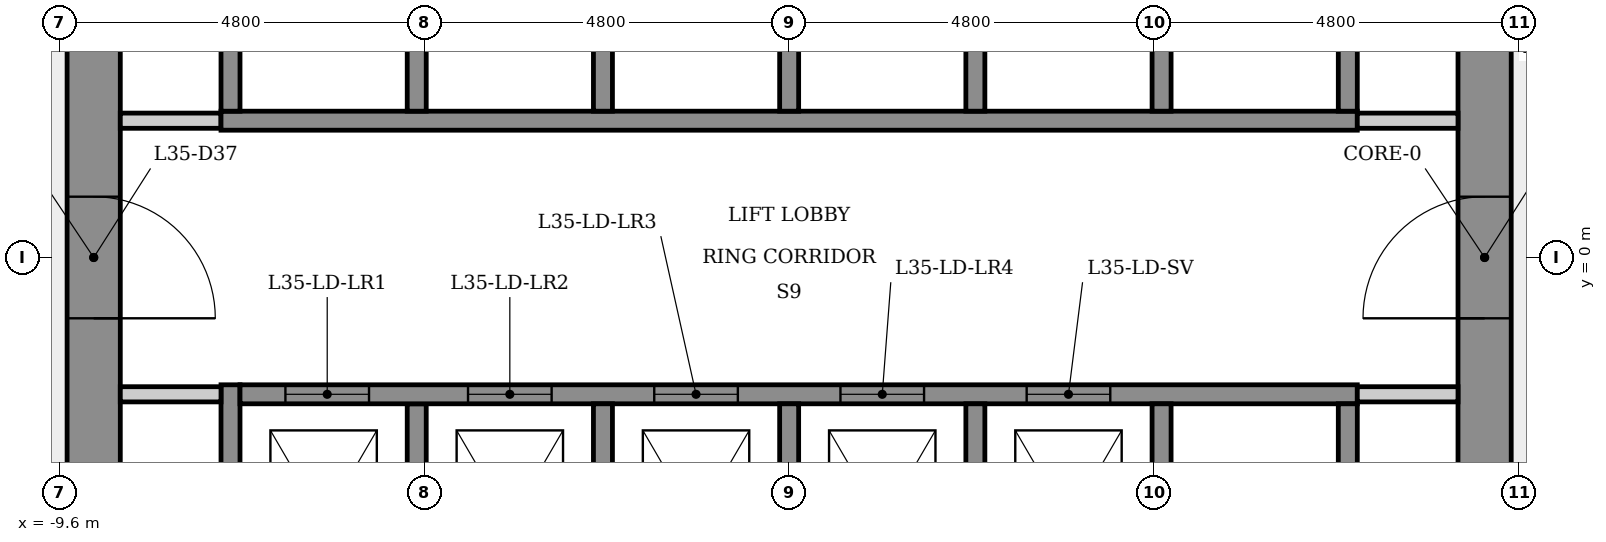
"""IFC4 building model, lengths in metres.
Left out: names, types, materials, properties, quantities, classifications, styles, units other than length and angle.
Written with IfcOpenShell. Run it as: python <this file> out.ifc"""

import sys

from ifc_helpers import new_model, si_unit, direction, frame, frame_2d, origin, place, context, subcontext, project, spatial, rectangle, extrude, element, fill, save


model = new_model("IFC4")
c1 = context("Model", 3, precision=1e-05, world=origin(), true_north=direction((0.0, 1.0)))
c2 = subcontext(c1, "Body", "Model", "MODEL_VIEW")
j1 = project(units=[si_unit("LENGTHUNIT", "METRE"), si_unit("PLANEANGLEUNIT", "RADIAN")], contexts=[c1])
p1 = place(None, origin())
s1 = spatial("IfcSite", under=j1, at=p1, CompositionType="ELEMENT")
p2 = place(p1, origin())
s2 = spatial("IfcBuilding", under=s1, at=p2, CompositionType="ELEMENT")
p3 = place(p2, frame((0.0, 0.0, 132.5)))
s3 = spatial("IfcBuildingStorey", under=s2, at=p3, CompositionType="ELEMENT", Elevation=132.5)
p4 = place(p3, frame((9.15, -5.485, 0.0), z_axis=(0.0, 0.0, 1.0), x_axis=(0.0, 1.0, 0.0)))
e1 = element("IfcWall", 1, at=p4, inside=s3, PredefinedType="SHEAR", context=c2, shape_type="SweptSolid", body=[
    extrude(rectangle(XDim=10.97, YDim=0.7, at=frame_2d((5.485, 0.0))), origin(), (0.0, 0.0, 1.0), 3.4),
])
p5 = place(p4, frame((4.685, 0.0, 0.0)))
e2 = element("IfcOpeningElement", 2, at=p5, cuts=e1, PredefinedType="OPENING", context=c2, shape_type="SweptSolid", body=[
    extrude(rectangle(XDim=1.6, YDim=2.1, at=frame_2d((0.8, 1.05))), frame((0.0, 0.36, 0.0), z_axis=(0.0, -1.0, 0.0), x_axis=(1.0, 0.0, 0.0)), (0.0, 0.0, 1.0), 0.72),
])
p6 = place(p3, frame((-9.15, 5.485, 0.0), z_axis=(0.0, 0.0, 1.0), x_axis=(0.0, -1.0, 0.0)))
e3 = element("IfcWall", 3, at=p6, inside=s3, PredefinedType="SHEAR", context=c2, shape_type="SweptSolid", body=[
    extrude(rectangle(XDim=10.97, YDim=0.7, at=frame_2d((5.485, 0.0))), origin(), (0.0, 0.0, 1.0), 3.4),
])
p7 = place(p6, frame((4.685, 0.0, 0.0)))
e4 = element("IfcOpeningElement", 4, at=p7, cuts=e3, PredefinedType="OPENING", context=c2, shape_type="SweptSolid", body=[
    extrude(rectangle(XDim=1.6, YDim=2.1, at=frame_2d((0.8, 1.05))), frame((0.0, 0.36, 0.0), z_axis=(0.0, -1.0, 0.0), x_axis=(1.0, 0.0, 0.0)), (0.0, 0.0, 1.0), 0.72),
])
p8 = place(p3, frame((-8.8, 1.8, 0.0), z_axis=(0.0, 0.0, 1.0), x_axis=(1.0, 0.0, 0.0)))
e5 = element("IfcWall", 5, at=p8, inside=s3, PredefinedType="PARTITIONING", context=c2, shape_type="SweptSolid", body=[
    extrude(rectangle(XDim=1.325, YDim=0.2, at=frame_2d((0.663, 0.0))), origin(), (0.0, 0.0, 1.0), 3.0),
])
p9 = place(p3, frame((-7.475, 1.8, 0.0), z_axis=(0.0, 0.0, 1.0), x_axis=(1.0, 0.0, 0.0)))
e6 = element("IfcWall", 6, at=p9, inside=s3, PredefinedType="SHEAR", context=c2, shape_type="SweptSolid", body=[
    extrude(rectangle(XDim=14.95, YDim=0.25, at=frame_2d((7.475, 0.0))), origin(), (0.0, 0.0, 1.0), 3.0),
])
p10 = place(p3, frame((-7.35, -5.846, 0.0), z_axis=(0.0, 0.0, 1.0), x_axis=(0.0, 1.0, 0.0)))
e7 = element("IfcWall", 7, at=p10, inside=s3, PredefinedType="SHEAR", context=c2, shape_type="SweptSolid", body=[
    extrude(rectangle(XDim=4.171, YDim=0.25, at=frame_2d((2.085, 0.0))), origin(), (0.0, 0.0, 1.0), 3.0),
])
p11 = place(p3, frame((-7.35, 1.925, 0.0), z_axis=(0.0, 0.0, 1.0), x_axis=(0.0, 1.0, 0.0)))
e8 = element("IfcWall", 8, at=p11, inside=s3, PredefinedType="SHEAR", context=c2, shape_type="SweptSolid", body=[
    extrude(rectangle(XDim=3.921, YDim=0.25, at=frame_2d((1.96, 0.0))), origin(), (0.0, 0.0, 1.0), 3.0),
])
p12 = place(p3, frame((-7.475, -1.8, 0.0), z_axis=(0.0, 0.0, 1.0), x_axis=(-1.0, 0.0, 0.0)))
e9 = element("IfcWall", 9, at=p12, inside=s3, PredefinedType="PARTITIONING", context=c2, shape_type="SweptSolid", body=[
    extrude(rectangle(XDim=1.325, YDim=0.2, at=frame_2d((0.663, 0.0))), origin(), (0.0, 0.0, 1.0), 3.0),
])
for number, where, z_axis, x_axis in (
    (10, (-4.9, -1.925, 0.0), (0.0, 0.0, 1.0), (0.0, -1.0, 0.0)),
    (11, (-4.9, 5.025, 0.0), (0.0, 0.0, 1.0), (0.0, -1.0, 0.0)),
):
    element("IfcWall", number, at=place(p3, frame(where, z_axis=z_axis, x_axis=x_axis)), inside=s3, PredefinedType="SHEAR", context=c2, shape_type="SweptSolid", body=[
        extrude(rectangle(XDim=3.1, YDim=0.25, at=frame_2d((1.55, 0.0))), origin(), (0.0, 0.0, 1.0), 3.4),
    ])
p13 = place(p3, frame((-7.225, -1.8, 0.0), z_axis=(0.0, 0.0, 1.0), x_axis=(1.0, 0.0, 0.0)))
e12 = element("IfcWall", 12, at=p13, inside=s3, PredefinedType="SHEAR", context=c2, shape_type="SweptSolid", body=[
    extrude(rectangle(XDim=14.7, YDim=0.25, at=frame_2d((7.35, 0.0))), origin(), (0.0, 0.0, 1.0), 3.0),
])
p14 = place(p13, frame((0.597, 0.0, 0.0)))
e13 = element("IfcOpeningElement", 13, at=p14, cuts=e12, PredefinedType="OPENING", context=c2, shape_type="SweptSolid", body=[
    extrude(rectangle(XDim=1.1, YDim=2.1, at=frame_2d((0.55, 1.05))), frame((0.0, 0.135, 0.0), z_axis=(0.0, -1.0, 0.0), x_axis=(1.0, 0.0, 0.0)), (0.0, 0.0, 1.0), 0.27),
])
p15 = place(p13, frame((3.0, 0.0, 0.0)))
e14 = element("IfcOpeningElement", 14, at=p15, cuts=e12, PredefinedType="OPENING", context=c2, shape_type="SweptSolid", body=[
    extrude(rectangle(XDim=1.1, YDim=2.1, at=frame_2d((0.55, 1.05))), frame((0.0, 0.135, 0.0), z_axis=(0.0, -1.0, 0.0), x_axis=(1.0, 0.0, 0.0)), (0.0, 0.0, 1.0), 0.27),
])
p16 = place(p13, frame((5.45, 0.0, 0.0)))
e15 = element("IfcOpeningElement", 15, at=p16, cuts=e12, PredefinedType="OPENING", context=c2, shape_type="SweptSolid", body=[
    extrude(rectangle(XDim=1.1, YDim=2.1, at=frame_2d((0.55, 1.05))), frame((0.0, 0.135, 0.0), z_axis=(0.0, -1.0, 0.0), x_axis=(1.0, 0.0, 0.0)), (0.0, 0.0, 1.0), 0.27),
])
p17 = place(p13, frame((7.9, 0.0, 0.0)))
e16 = element("IfcOpeningElement", 16, at=p17, cuts=e12, PredefinedType="OPENING", context=c2, shape_type="SweptSolid", body=[
    extrude(rectangle(XDim=1.1, YDim=2.1, at=frame_2d((0.55, 1.05))), frame((0.0, 0.135, 0.0), z_axis=(0.0, -1.0, 0.0), x_axis=(1.0, 0.0, 0.0)), (0.0, 0.0, 1.0), 0.27),
])
p18 = place(p13, frame((10.35, 0.0, 0.0)))
e17 = element("IfcOpeningElement", 17, at=p18, cuts=e12, PredefinedType="OPENING", context=c2, shape_type="SweptSolid", body=[
    extrude(rectangle(XDim=1.1, YDim=2.1, at=frame_2d((0.55, 1.05))), frame((0.0, 0.135, 0.0), z_axis=(0.0, -1.0, 0.0), x_axis=(1.0, 0.0, 0.0)), (0.0, 0.0, 1.0), 0.27),
])
for number, where, z_axis, x_axis in (
    (18, (-2.45, -1.925, 0.0), (0.0, 0.0, 1.0), (0.0, -1.0, 0.0)),
    (19, (-2.45, 5.025, 0.0), (0.0, 0.0, 1.0), (0.0, -1.0, 0.0)),
    (20, (0.0, -1.925, 0.0), (0.0, 0.0, 1.0), (0.0, -1.0, 0.0)),
    (21, (0.0, 5.025, 0.0), (0.0, 0.0, 1.0), (0.0, -1.0, 0.0)),
    (22, (2.45, -1.925, 0.0), (0.0, 0.0, 1.0), (0.0, -1.0, 0.0)),
    (23, (2.45, 5.025, 0.0), (0.0, 0.0, 1.0), (0.0, -1.0, 0.0)),
    (24, (4.9, -1.925, 0.0), (0.0, 0.0, 1.0), (0.0, -1.0, 0.0)),
    (25, (4.9, 5.025, 0.0), (0.0, 0.0, 1.0), (0.0, -1.0, 0.0)),
):
    element("IfcWall", number, at=place(p3, frame(where, z_axis=z_axis, x_axis=x_axis)), inside=s3, PredefinedType="SHEAR", context=c2, shape_type="SweptSolid", body=[
        extrude(rectangle(XDim=3.1, YDim=0.25, at=frame_2d((1.55, 0.0))), origin(), (0.0, 0.0, 1.0), 3.4),
    ])
p19 = place(p3, frame((7.475, 1.8, 0.0), z_axis=(0.0, 0.0, 1.0), x_axis=(1.0, 0.0, 0.0)))
e26 = element("IfcWall", 26, at=p19, inside=s3, PredefinedType="PARTITIONING", context=c2, shape_type="SweptSolid", body=[
    extrude(rectangle(XDim=1.325, YDim=0.2, at=frame_2d((0.663, 0.0))), origin(), (0.0, 0.0, 1.0), 3.0),
])
for number, where, z_axis, x_axis in (
    (27, (7.35, -1.925, 0.0), (0.0, 0.0, 1.0), (0.0, -1.0, 0.0)),
    (28, (7.35, 5.025, 0.0), (0.0, 0.0, 1.0), (0.0, -1.0, 0.0)),
):
    element("IfcWall", number, at=place(p3, frame(where, z_axis=z_axis, x_axis=x_axis)), inside=s3, PredefinedType="SHEAR", context=c2, shape_type="SweptSolid", body=[
        extrude(rectangle(XDim=3.1, YDim=0.25, at=frame_2d((1.55, 0.0))), origin(), (0.0, 0.0, 1.0), 3.4),
    ])
p20 = place(p3, frame((8.8, -1.8, 0.0), z_axis=(0.0, 0.0, 1.0), x_axis=(-1.0, 0.0, 0.0)))
e29 = element("IfcWall", 29, at=p20, inside=s3, PredefinedType="PARTITIONING", context=c2, shape_type="SweptSolid", body=[
    extrude(rectangle(XDim=1.325, YDim=0.2, at=frame_2d((0.663, 0.0))), origin(), (0.0, 0.0, 1.0), 3.0),
])
p21 = place(p14, origin())
e30 = element("IfcDoor", 30, at=p21, inside=s3, OperationType="SLIDING_TO_LEFT", PredefinedType="DOOR", context=c2, shape_type="SweptSolid", body=[
    extrude(rectangle(XDim=1.1, YDim=2.1, at=frame_2d((0.55, 1.05))), frame((0.0, 0.025, 0.0), z_axis=(0.0, -1.0, 0.0), x_axis=(1.0, 0.0, 0.0)), (0.0, 0.0, 1.0), 0.05),
])
fill(e13, e30)
p22 = place(p15, origin())
e31 = element("IfcDoor", 31, at=p22, inside=s3, OperationType="SLIDING_TO_LEFT", PredefinedType="DOOR", context=c2, shape_type="SweptSolid", body=[
    extrude(rectangle(XDim=1.1, YDim=2.1, at=frame_2d((0.55, 1.05))), frame((0.0, 0.025, 0.0), z_axis=(0.0, -1.0, 0.0), x_axis=(1.0, 0.0, 0.0)), (0.0, 0.0, 1.0), 0.05),
])
fill(e14, e31)
p23 = place(p16, origin())
e32 = element("IfcDoor", 32, at=p23, inside=s3, OperationType="SLIDING_TO_LEFT", PredefinedType="DOOR", context=c2, shape_type="SweptSolid", body=[
    extrude(rectangle(XDim=1.1, YDim=2.1, at=frame_2d((0.55, 1.05))), frame((0.0, 0.025, 0.0), z_axis=(0.0, -1.0, 0.0), x_axis=(1.0, 0.0, 0.0)), (0.0, 0.0, 1.0), 0.05),
])
fill(e15, e32)
p24 = place(p17, origin())
e33 = element("IfcDoor", 33, at=p24, inside=s3, OperationType="SLIDING_TO_LEFT", PredefinedType="DOOR", context=c2, shape_type="SweptSolid", body=[
    extrude(rectangle(XDim=1.1, YDim=2.1, at=frame_2d((0.55, 1.05))), frame((0.0, 0.025, 0.0), z_axis=(0.0, -1.0, 0.0), x_axis=(1.0, 0.0, 0.0)), (0.0, 0.0, 1.0), 0.05),
])
fill(e16, e33)
p25 = place(p18, origin())
e34 = element("IfcDoor", 34, at=p25, inside=s3, OperationType="SLIDING_TO_LEFT", PredefinedType="DOOR", context=c2, shape_type="SweptSolid", body=[
    extrude(rectangle(XDim=1.1, YDim=2.1, at=frame_2d((0.55, 1.05))), frame((0.0, 0.025, 0.0), z_axis=(0.0, -1.0, 0.0), x_axis=(1.0, 0.0, 0.0)), (0.0, 0.0, 1.0), 0.05),
])
fill(e17, e34)
p26 = place(p5, origin())
e35 = element("IfcDoor", 35, at=p26, inside=s3, OperationType="SINGLE_SWING_LEFT", PredefinedType="DOOR", context=c2, shape_type="SweptSolid", body=[
    extrude(rectangle(XDim=1.6, YDim=2.1, at=frame_2d((0.8, 1.05))), frame((0.0, 0.025, 0.0), z_axis=(0.0, -1.0, 0.0), x_axis=(1.0, 0.0, 0.0)), (0.0, 0.0, 1.0), 0.05),
])
fill(e2, e35)
p27 = place(p7, origin())
e36 = element("IfcDoor", 36, at=p27, inside=s3, OperationType="SINGLE_SWING_RIGHT", PredefinedType="DOOR", context=c2, shape_type="SweptSolid", body=[
    extrude(rectangle(XDim=1.6, YDim=2.1, at=frame_2d((0.8, 1.05))), frame((0.0, 0.025, 0.0), z_axis=(0.0, -1.0, 0.0), x_axis=(1.0, 0.0, 0.0)), (0.0, 0.0, 1.0), 0.05),
])
fill(e4, e36)
save(model, sys.argv[1])
